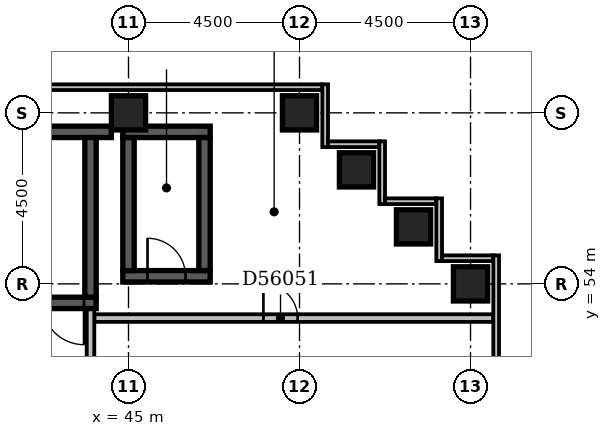
"""IFC4 building model, lengths in metres.
Left out: names, types, materials, properties, quantities, classifications, styles, units other than length and angle.
Written with IfcOpenShell. Run it as: python <this file> out.ifc"""

import sys

from ifc_helpers import new_model, si_unit, direction, frame, frame_2d, origin, origin_2d, place, context, subcontext, project, spatial, rectangle, extrude, element, fill, save


model = new_model("IFC4")
c1 = context("Model", 3, precision=1e-05, world=origin(), true_north=direction((0.0, 1.0)))
c2 = subcontext(c1, "Body", "Model", "MODEL_VIEW")
j1 = project(units=[si_unit("LENGTHUNIT", "METRE"), si_unit("PLANEANGLEUNIT", "RADIAN")], contexts=[c1])
p1 = place(None, origin())
s1 = spatial("IfcSite", under=j1, at=p1, CompositionType="ELEMENT")
p2 = place(p1, origin())
s2 = spatial("IfcBuilding", under=s1, at=p2, CompositionType="ELEMENT")
p3 = place(p2, frame((0.0, 0.0, 218.6)))
s3 = spatial("IfcBuildingStorey", under=s2, at=p3, CompositionType="ELEMENT", Elevation=218.6)
p4 = place(p3, frame((37.15, 53.5, -0.3), z_axis=(0.0, 0.0, 1.0), x_axis=(1.0, 0.0, 0.0)))
e1 = element("IfcWall", 1, at=p4, inside=s3, PredefinedType="SHEAR", context=c2, shape_type="SweptSolid", body=[
    extrude(rectangle(XDim=7.0, YDim=0.3, at=frame_2d((3.5, 0.0))), origin(), (0.0, 0.0, 1.0), 3.6),
])
p5 = place(p4, frame((5.58, 0.0, 0.3)))
e2 = element("IfcOpeningElement", 2, at=p5, cuts=e1, PredefinedType="OPENING", context=c2, shape_type="SweptSolid", body=[
    extrude(rectangle(XDim=1.1, YDim=2.1, at=frame_2d((0.55, 1.05))), frame((0.0, 0.162, 0.0), z_axis=(0.0, -1.0, 0.0), x_axis=(1.0, 0.0, 0.0)), (0.0, 0.0, 1.0), 0.324),
])
p6 = place(p3, frame((37.15, 58.0, -0.3), z_axis=(0.0, 0.0, 1.0), x_axis=(1.0, 0.0, 0.0)))
e3 = element("IfcWall", 3, at=p6, inside=s3, PredefinedType="SHEAR", context=c2, shape_type="SweptSolid", body=[
    extrude(rectangle(XDim=7.4, YDim=0.3, at=frame_2d((3.7, 0.0))), origin(), (0.0, 0.0, 1.0), 3.6),
])
p7 = place(p3, frame((44.0, 53.65, -0.3), z_axis=(0.0, 0.0, 1.0), x_axis=(0.0, 1.0, 0.0)))
e4 = element("IfcWall", 4, at=p7, inside=s3, PredefinedType="SHEAR", context=c2, shape_type="SweptSolid", body=[
    extrude(rectangle(XDim=4.2, YDim=0.3, at=frame_2d((2.1, 0.0))), origin(), (0.0, 0.0, 1.0), 3.6),
])
p8 = place(p3, frame((44.85, 54.2, -0.3), z_axis=(0.0, 0.0, 1.0), x_axis=(1.0, 0.0, 0.0)))
e5 = element("IfcWall", 5, at=p8, inside=s3, PredefinedType="SHEAR", context=c2, shape_type="SweptSolid", body=[
    extrude(rectangle(XDim=2.3, YDim=0.3, at=frame_2d((1.15, 0.0))), origin(), (0.0, 0.0, 1.0), 3.6),
])
p9 = place(p8, frame((0.65, 0.0, 0.3)))
e6 = element("IfcOpeningElement", 6, at=p9, cuts=e5, PredefinedType="OPENING", context=c2, shape_type="SweptSolid", body=[
    extrude(rectangle(XDim=1.0, YDim=2.1, at=frame_2d((0.5, 1.05))), frame((0.0, 0.162, 0.0), z_axis=(0.0, -1.0, 0.0), x_axis=(1.0, 0.0, 0.0)), (0.0, 0.0, 1.0), 0.324),
])
p10 = place(p3, frame((44.85, 58.0, -0.3), z_axis=(0.0, 0.0, 1.0), x_axis=(1.0, 0.0, 0.0)))
e7 = element("IfcWall", 7, at=p10, inside=s3, PredefinedType="SHEAR", context=c2, shape_type="SweptSolid", body=[
    extrude(rectangle(XDim=2.3, YDim=0.3, at=frame_2d((1.15, 0.0))), origin(), (0.0, 0.0, 1.0), 3.6),
])
for number, where, z_axis, x_axis in (
    (8, (45.0, 54.35, -0.3), (0.0, 0.0, 1.0), (0.0, 1.0, 0.0)),
    (9, (47.0, 54.35, -0.3), (0.0, 0.0, 1.0), (0.0, 1.0, 0.0)),
):
    element("IfcWall", number, at=place(p3, frame(where, z_axis=z_axis, x_axis=x_axis)), inside=s3, PredefinedType="SHEAR", context=c2, shape_type="SweptSolid", body=[
        extrude(rectangle(XDim=3.5, YDim=0.3, at=frame_2d((1.75, 0.0))), origin(), (0.0, 0.0, 1.0), 3.6),
    ])
for number, where, z_axis, x_axis in (
    (10, (54.0, 54.0, -0.3), (0.0, 0.0, 1.0), (1.0, 0.0, 0.0)),
    (11, (52.5, 55.5, -0.3), (0.0, 0.0, 1.0), (1.0, 0.0, 0.0)),
    (12, (51.0, 57.0, -0.3), (0.0, 0.0, 1.0), (1.0, 0.0, 0.0)),
    (13, (45.0, 58.5, -0.3), (0.0, 0.0, 1.0), (1.0, 0.0, 0.0)),
    (14, (49.5, 58.5, -0.3), (0.0, 0.0, 1.0), (1.0, 0.0, 0.0)),
):
    element("IfcColumn", number, at=place(p3, frame(where, z_axis=z_axis, x_axis=x_axis)), inside=s3, PredefinedType="COLUMN", context=c2, shape_type="SweptSolid", body=[
        extrude(rectangle(XDim=0.9, YDim=0.9, at=origin_2d()), origin(), (0.0, 0.0, 1.0), 3.6),
    ])
p11 = place(p3, frame((54.675, 39.9, 0.0), z_axis=(0.0, 0.0, 1.0), x_axis=(0.0, 1.0, 0.0)))
e15 = element("IfcWall", 15, at=p11, inside=s3, PredefinedType="STANDARD", context=c2, shape_type="SweptSolid", body=[
    extrude(rectangle(XDim=14.85, YDim=0.15, at=frame_2d((7.425, 0.0))), origin(), (0.0, 0.0, 1.0), 2.7),
])
p12 = place(p3, frame((54.6, 54.675, 0.0), z_axis=(0.0, 0.0, 1.0), x_axis=(-1.0, 0.0, 0.0)))
e16 = element("IfcWall", 16, at=p12, inside=s3, PredefinedType="STANDARD", context=c2, shape_type="SweptSolid", body=[
    extrude(rectangle(XDim=1.35, YDim=0.15, at=frame_2d((0.675, 0.0))), origin(), (0.0, 0.0, 1.0), 2.7),
])
p13 = place(p3, frame((53.175, 54.6, 0.0), z_axis=(0.0, 0.0, 1.0), x_axis=(0.0, 1.0, 0.0)))
e17 = element("IfcWall", 17, at=p13, inside=s3, PredefinedType="STANDARD", context=c2, shape_type="SweptSolid", body=[
    extrude(rectangle(XDim=1.65, YDim=0.15, at=frame_2d((0.825, 0.0))), origin(), (0.0, 0.0, 1.0), 2.7),
])
p14 = place(p3, frame((53.1, 56.175, 0.0), z_axis=(0.0, 0.0, 1.0), x_axis=(-1.0, 0.0, 0.0)))
e18 = element("IfcWall", 18, at=p14, inside=s3, PredefinedType="STANDARD", context=c2, shape_type="SweptSolid", body=[
    extrude(rectangle(XDim=1.35, YDim=0.15, at=frame_2d((0.675, 0.0))), origin(), (0.0, 0.0, 1.0), 2.7),
])
p15 = place(p3, frame((51.675, 56.1, 0.0), z_axis=(0.0, 0.0, 1.0), x_axis=(0.0, 1.0, 0.0)))
e19 = element("IfcWall", 19, at=p15, inside=s3, PredefinedType="STANDARD", context=c2, shape_type="SweptSolid", body=[
    extrude(rectangle(XDim=1.65, YDim=0.15, at=frame_2d((0.825, 0.0))), origin(), (0.0, 0.0, 1.0), 2.7),
])
p16 = place(p3, frame((51.6, 57.675, 0.0), z_axis=(0.0, 0.0, 1.0), x_axis=(-1.0, 0.0, 0.0)))
e20 = element("IfcWall", 20, at=p16, inside=s3, PredefinedType="STANDARD", context=c2, shape_type="SweptSolid", body=[
    extrude(rectangle(XDim=1.35, YDim=0.15, at=frame_2d((0.675, 0.0))), origin(), (0.0, 0.0, 1.0), 2.7),
])
p17 = place(p3, frame((50.175, 57.6, 0.0), z_axis=(0.0, 0.0, 1.0), x_axis=(0.0, 1.0, 0.0)))
e21 = element("IfcWall", 21, at=p17, inside=s3, PredefinedType="STANDARD", context=c2, shape_type="SweptSolid", body=[
    extrude(rectangle(XDim=1.65, YDim=0.15, at=frame_2d((0.825, 0.0))), origin(), (0.0, 0.0, 1.0), 2.7),
])
p18 = place(p3, frame((50.1, 59.175, 0.0), z_axis=(0.0, 0.0, 1.0), x_axis=(-1.0, 0.0, 0.0)))
e22 = element("IfcWall", 22, at=p18, inside=s3, PredefinedType="STANDARD", context=c2, shape_type="SweptSolid", body=[
    extrude(rectangle(XDim=50.85, YDim=0.15, at=frame_2d((25.425, 0.0))), origin(), (0.0, 0.0, 1.0), 2.7),
])
p19 = place(p18, frame((20.857, 0.0, 0.6)))
e23 = element("IfcOpeningElement", 23, at=p19, cuts=e22, PredefinedType="OPENING", context=c2, shape_type="SweptSolid", body=[
    extrude(rectangle(XDim=1.5, YDim=1.8, at=frame_2d((0.75, 0.9))), frame((0.0, 0.087, 0.0), z_axis=(0.0, -1.0, 0.0), x_axis=(1.0, 0.0, 0.0)), (0.0, 0.0, 1.0), 0.174),
])
p20 = place(p3, frame((44.0, 51.6, 0.0), z_axis=(0.0, 0.0, 1.0), x_axis=(0.0, 1.0, 0.0)))
e24 = element("IfcWall", 24, at=p20, inside=s3, PredefinedType="PARTITIONING", context=c2, shape_type="SweptSolid", body=[
    extrude(rectangle(XDim=1.73, YDim=0.2, at=frame_2d((0.865, 0.0))), origin(), (0.0, 0.0, 1.0), 3.3),
])
p21 = place(p3, frame((44.1, 53.1, 0.0), z_axis=(0.0, 0.0, 1.0), x_axis=(1.0, 0.0, 0.0)))
e25 = element("IfcWall", 25, at=p21, inside=s3, PredefinedType="PARTITIONING", context=c2, shape_type="SweptSolid", body=[
    extrude(rectangle(XDim=10.5, YDim=0.2, at=frame_2d((5.25, 0.0))), origin(), (0.0, 0.0, 1.0), 3.3),
])
p22 = place(p21, frame((4.45, 0.0, 0.0)))
e26 = element("IfcOpeningElement", 26, at=p22, cuts=e25, PredefinedType="OPENING", context=c2, shape_type="SweptSolid", body=[
    extrude(rectangle(XDim=0.9, YDim=2.1, at=frame_2d((0.45, 1.05))), frame((0.0, 0.112, 0.0), z_axis=(0.0, -1.0, 0.0), x_axis=(1.0, 0.0, 0.0)), (0.0, 0.0, 1.0), 0.224),
])
p23 = place(p9, origin())
e27 = element("IfcDoor", 27, at=p23, inside=s3, OperationType="SINGLE_SWING_LEFT", PredefinedType="DOOR", context=c2, shape_type="SweptSolid", body=[
    extrude(rectangle(XDim=1.0, YDim=2.1, at=frame_2d((0.5, 1.05))), frame((0.0, 0.025, 0.0), z_axis=(0.0, -1.0, 0.0), x_axis=(1.0, 0.0, 0.0)), (0.0, 0.0, 1.0), 0.05),
])
fill(e6, e27)
p24 = place(p5, origin())
e28 = element("IfcDoor", 28, at=p24, inside=s3, OperationType="SINGLE_SWING_RIGHT", PredefinedType="DOOR", context=c2, shape_type="SweptSolid", body=[
    extrude(rectangle(XDim=1.1, YDim=2.1, at=frame_2d((0.55, 1.05))), frame((0.0, 0.025, 0.0), z_axis=(0.0, -1.0, 0.0), x_axis=(1.0, 0.0, 0.0)), (0.0, 0.0, 1.0), 0.05),
])
fill(e2, e28)
p25 = place(p22, origin())
e29 = element("IfcDoor", 29, at=p25, inside=s3, OperationType="SINGLE_SWING_LEFT", PredefinedType="DOOR", context=c2, shape_type="SweptSolid", body=[
    extrude(rectangle(XDim=0.9, YDim=2.1, at=frame_2d((0.45, 1.05))), frame((0.0, 0.025, 0.0), z_axis=(0.0, -1.0, 0.0), x_axis=(1.0, 0.0, 0.0)), (0.0, 0.0, 1.0), 0.05),
])
fill(e26, e29)
save(model, sys.argv[1])
